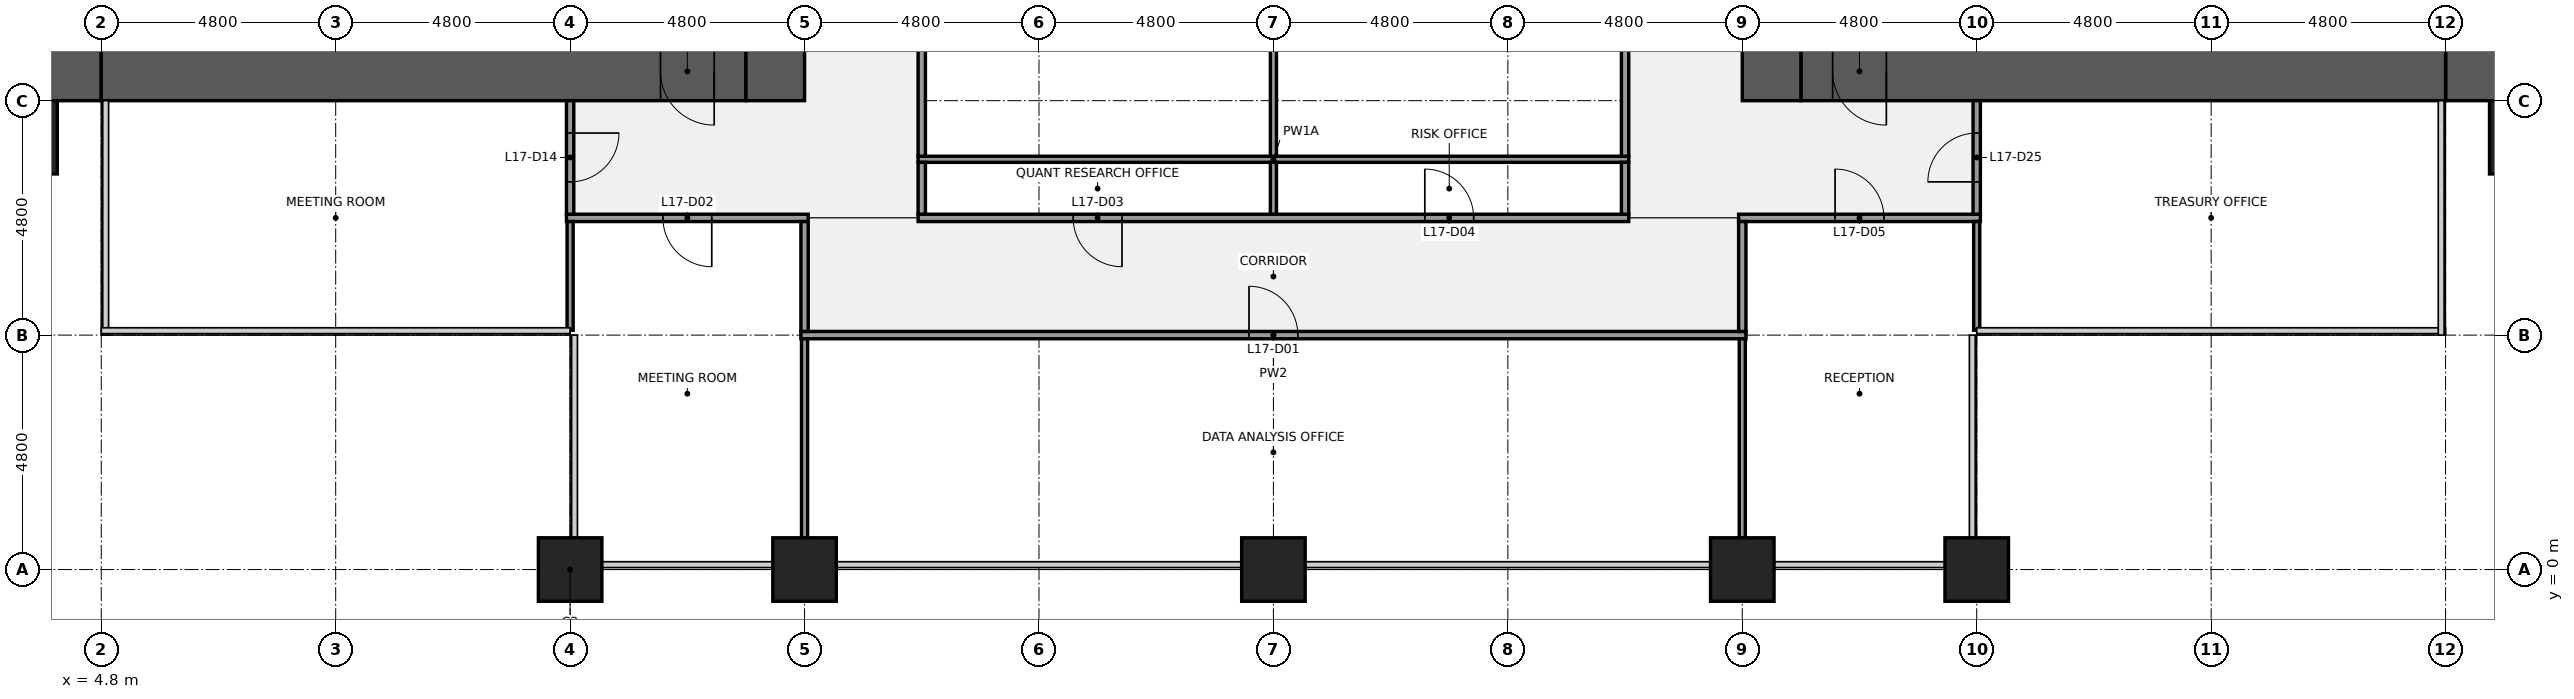
"""IFC4 building model, lengths in metres.
Left out: names, types, materials, properties, quantities, classifications, styles, units other than length and angle.
Written with IfcOpenShell. Run it as: python <this file> out.ifc"""

import sys

from ifc_helpers import new_model, si_unit, direction, frame, frame_2d, origin, origin_2d, place, context, subcontext, project, spatial, rectangle, extrude, element, fill, save


model = new_model("IFC4")
c1 = context("Model", 3, precision=1e-05, world=origin(), true_north=direction((0.0, 1.0)))
c2 = subcontext(c1, "Body", "Model", "MODEL_VIEW")
j1 = project(units=[si_unit("LENGTHUNIT", "METRE"), si_unit("PLANEANGLEUNIT", "RADIAN")], contexts=[c1])
p1 = place(None, origin())
s1 = spatial("IfcSite", under=j1, at=p1, CompositionType="ELEMENT")
p2 = place(p1, origin())
s2 = spatial("IfcBuilding", under=s1, at=p2, CompositionType="ELEMENT")
p3 = place(p2, frame((0.0, 0.0, 79.0)))
s3 = spatial("IfcBuildingStorey", under=s2, at=p3, CompositionType="ELEMENT", Elevation=79.0)
for number, where, z_axis, x_axis in (
    (1, (14.4, 0.0, 0.0), (0.0, 0.0, 1.0), (1.0, 0.0, 0.0)),
    (2, (19.2, 0.0, 0.0), (0.0, 0.0, 1.0), (1.0, 0.0, 0.0)),
    (3, (28.8, 0.0, 0.0), (0.0, 0.0, 1.0), (1.0, 0.0, 0.0)),
    (4, (38.4, 0.0, 0.0), (0.0, 0.0, 1.0), (1.0, 0.0, 0.0)),
    (5, (43.2, 0.0, 0.0), (0.0, 0.0, 1.0), (1.0, 0.0, 0.0)),
):
    element("IfcColumn", number, at=place(p3, frame(where, z_axis=z_axis, x_axis=x_axis)), inside=s3, PredefinedType="COLUMN", context=c2, shape_type="SweptSolid", body=[
        extrude(rectangle(XDim=1.3, YDim=1.3, at=origin_2d()), origin(), (0.0, 0.0, 1.0), 4.0),
    ])
p4 = place(p3, frame((4.8, 10.2, 0.0), z_axis=(0.0, 0.0, 1.0), x_axis=(-1.0, 0.0, 0.0)))
e6 = element("IfcWall", 6, at=p4, inside=s3, PredefinedType="SHEAR", context=c2, shape_type="SweptSolid", body=[
    extrude(rectangle(XDim=3.6, YDim=1.2, at=frame_2d((1.8, 0.0))), origin(), (0.0, 0.0, 1.0), 3.84),
])
p5 = place(p3, frame((18.0, 10.2, 0.0), z_axis=(0.0, 0.0, 1.0), x_axis=(-1.0, 0.0, 0.0)))
e7 = element("IfcWall", 7, at=p5, inside=s3, PredefinedType="SHEAR", context=c2, shape_type="SweptSolid", body=[
    extrude(rectangle(XDim=13.2, YDim=1.2, at=frame_2d((6.6, 0.0))), origin(), (0.0, 0.0, 1.0), 3.84),
])
p6 = place(p5, frame((0.65, 0.0, 0.0)))
e8 = element("IfcOpeningElement", 8, at=p6, cuts=e7, PredefinedType="OPENING", context=c2, shape_type="SweptSolid", body=[
    extrude(rectangle(XDim=1.1, YDim=2.1, at=frame_2d((0.55, 1.05))), frame((0.0, 0.61, 0.0), z_axis=(0.0, -1.0, 0.0), x_axis=(1.0, 0.0, 0.0)), (0.0, 0.0, 1.0), 1.22),
])
p7 = place(p3, frame((18.6, 38.4, 0.0), z_axis=(0.0, 0.0, 1.0), x_axis=(0.0, -1.0, 0.0)))
e9 = element("IfcWall", 9, at=p7, inside=s3, PredefinedType="SHEAR", context=c2, shape_type="SweptSolid", body=[
    extrude(rectangle(XDim=28.8, YDim=1.2, at=frame_2d((14.4, 0.0))), origin(), (0.0, 0.0, 1.0), 3.84),
])
p8 = place(p7, frame((18.3, 0.0, 0.0)))
e10 = element("IfcOpeningElement", 10, at=p8, cuts=e9, PredefinedType="OPENING", context=c2, shape_type="SweptSolid", body=[
    extrude(rectangle(XDim=1.8, YDim=2.1, at=frame_2d((0.9, 1.05))), frame((0.0, 0.61, 0.0), z_axis=(0.0, -1.0, 0.0), x_axis=(1.0, 0.0, 0.0)), (0.0, 0.0, 1.0), 1.22),
])
p9 = place(p7, frame((8.7, 0.0, 0.0)))
e11 = element("IfcOpeningElement", 11, at=p9, cuts=e9, PredefinedType="OPENING", context=c2, shape_type="SweptSolid", body=[
    extrude(rectangle(XDim=1.8, YDim=2.1, at=frame_2d((0.9, 1.05))), frame((0.0, 0.61, 0.0), z_axis=(0.0, -1.0, 0.0), x_axis=(1.0, 0.0, 0.0)), (0.0, 0.0, 1.0), 1.22),
])
p10 = place(p3, frame((56.4, 10.2, 0.0), z_axis=(0.0, 0.0, 1.0), x_axis=(-1.0, 0.0, 0.0)))
e12 = element("IfcWall", 12, at=p10, inside=s3, PredefinedType="SHEAR", context=c2, shape_type="SweptSolid", body=[
    extrude(rectangle(XDim=3.6, YDim=1.2, at=frame_2d((1.8, 0.0))), origin(), (0.0, 0.0, 1.0), 3.84),
])
p11 = place(p3, frame((52.8, 10.2, 0.0), z_axis=(0.0, 0.0, 1.0), x_axis=(-1.0, 0.0, 0.0)))
e13 = element("IfcWall", 13, at=p11, inside=s3, PredefinedType="SHEAR", context=c2, shape_type="SweptSolid", body=[
    extrude(rectangle(XDim=13.2, YDim=1.2, at=frame_2d((6.6, 0.0))), origin(), (0.0, 0.0, 1.0), 3.84),
])
p12 = place(p11, frame((11.45, 0.0, 0.0)))
e14 = element("IfcOpeningElement", 14, at=p12, cuts=e13, PredefinedType="OPENING", context=c2, shape_type="SweptSolid", body=[
    extrude(rectangle(XDim=1.1, YDim=2.1, at=frame_2d((0.55, 1.05))), frame((0.0, 0.61, 0.0), z_axis=(0.0, -1.0, 0.0), x_axis=(1.0, 0.0, 0.0)), (0.0, 0.0, 1.0), 1.22),
])
p13 = place(p3, frame((39.0, 9.6, 0.0), z_axis=(0.0, 0.0, 1.0), x_axis=(0.0, 1.0, 0.0)))
e15 = element("IfcWall", 15, at=p13, inside=s3, PredefinedType="SHEAR", context=c2, shape_type="SweptSolid", body=[
    extrude(rectangle(XDim=28.8, YDim=1.2, at=frame_2d((14.4, 0.0))), origin(), (0.0, 0.0, 1.0), 3.84),
])
p14 = place(p13, frame((8.7, 0.0, 0.0)))
e16 = element("IfcOpeningElement", 16, at=p14, cuts=e15, PredefinedType="OPENING", context=c2, shape_type="SweptSolid", body=[
    extrude(rectangle(XDim=1.8, YDim=2.1, at=frame_2d((0.9, 1.05))), frame((0.0, 0.61, 0.0), z_axis=(0.0, -1.0, 0.0), x_axis=(1.0, 0.0, 0.0)), (0.0, 0.0, 1.0), 1.22),
])
p15 = place(p13, frame((18.3, 0.0, 0.0)))
e17 = element("IfcOpeningElement", 17, at=p15, cuts=e15, PredefinedType="OPENING", context=c2, shape_type="SweptSolid", body=[
    extrude(rectangle(XDim=1.8, YDim=2.1, at=frame_2d((0.9, 1.05))), frame((0.0, 0.61, 0.0), z_axis=(0.0, -1.0, 0.0), x_axis=(1.0, 0.0, 0.0)), (0.0, 0.0, 1.0), 1.22),
])
p16 = place(p3, frame((19.125, 4.8, 0.0), z_axis=(0.0, 0.0, 1.0), x_axis=(1.0, 0.0, 0.0)))
e18 = element("IfcWall", 18, at=p16, inside=s3, PredefinedType="PARTITIONING", context=c2, shape_type="SweptSolid", body=[
    extrude(rectangle(XDim=19.35, YDim=0.15, at=frame_2d((9.675, 0.0))), origin(), (0.0, 0.0, 1.0), 2.849),
])
p17 = place(p16, frame((9.175, 0.0, 0.0)))
e19 = element("IfcOpeningElement", 19, at=p17, cuts=e18, PredefinedType="OPENING", context=c2, shape_type="SweptSolid", body=[
    extrude(rectangle(XDim=1.0, YDim=2.1, at=frame_2d((0.5, 1.05))), frame((0.0, 0.085, 0.0), z_axis=(0.0, -1.0, 0.0), x_axis=(1.0, 0.0, 0.0)), (0.0, 0.0, 1.0), 0.17),
])
p18 = place(p3, frame((14.325, 7.2, 0.0), z_axis=(0.0, 0.0, 1.0), x_axis=(1.0, 0.0, 0.0)))
e20 = element("IfcWall", 20, at=p18, inside=s3, PredefinedType="PARTITIONING", context=c2, shape_type="SweptSolid", body=[
    extrude(rectangle(XDim=4.95, YDim=0.15, at=frame_2d((2.475, 0.0))), origin(), (0.0, 0.0, 1.0), 2.849),
])
p19 = place(p18, frame((1.975, 0.0, 0.0)))
e21 = element("IfcOpeningElement", 21, at=p19, cuts=e20, PredefinedType="OPENING", context=c2, shape_type="SweptSolid", body=[
    extrude(rectangle(XDim=1.0, YDim=2.1, at=frame_2d((0.5, 1.05))), frame((0.0, 0.085, 0.0), z_axis=(0.0, -1.0, 0.0), x_axis=(1.0, 0.0, 0.0)), (0.0, 0.0, 1.0), 0.17),
])
p20 = place(p3, frame((21.525, 7.2, 0.0), z_axis=(0.0, 0.0, 1.0), x_axis=(1.0, 0.0, 0.0)))
e22 = element("IfcWall", 22, at=p20, inside=s3, PredefinedType="PARTITIONING", context=c2, shape_type="SweptSolid", body=[
    extrude(rectangle(XDim=14.55, YDim=0.15, at=frame_2d((7.275, 0.0))), origin(), (0.0, 0.0, 1.0), 2.849),
])
p21 = place(p20, frame((3.175, 0.0, 0.0)))
e23 = element("IfcOpeningElement", 23, at=p21, cuts=e22, PredefinedType="OPENING", context=c2, shape_type="SweptSolid", body=[
    extrude(rectangle(XDim=1.0, YDim=2.1, at=frame_2d((0.5, 1.05))), frame((0.0, 0.085, 0.0), z_axis=(0.0, -1.0, 0.0), x_axis=(1.0, 0.0, 0.0)), (0.0, 0.0, 1.0), 0.17),
])
p22 = place(p20, frame((10.375, 0.0, 0.0)))
e24 = element("IfcOpeningElement", 24, at=p22, cuts=e22, PredefinedType="OPENING", context=c2, shape_type="SweptSolid", body=[
    extrude(rectangle(XDim=1.0, YDim=2.1, at=frame_2d((0.5, 1.05))), frame((0.0, 0.085, 0.0), z_axis=(0.0, -1.0, 0.0), x_axis=(1.0, 0.0, 0.0)), (0.0, 0.0, 1.0), 0.17),
])
p23 = place(p3, frame((38.325, 7.2, 0.0), z_axis=(0.0, 0.0, 1.0), x_axis=(1.0, 0.0, 0.0)))
e25 = element("IfcWall", 25, at=p23, inside=s3, PredefinedType="PARTITIONING", context=c2, shape_type="SweptSolid", body=[
    extrude(rectangle(XDim=4.95, YDim=0.15, at=frame_2d((2.475, 0.0))), origin(), (0.0, 0.0, 1.0), 2.849),
])
p24 = place(p23, frame((1.975, 0.0, 0.0)))
e26 = element("IfcOpeningElement", 26, at=p24, cuts=e25, PredefinedType="OPENING", context=c2, shape_type="SweptSolid", body=[
    extrude(rectangle(XDim=1.0, YDim=2.1, at=frame_2d((0.5, 1.05))), frame((0.0, 0.085, 0.0), z_axis=(0.0, -1.0, 0.0), x_axis=(1.0, 0.0, 0.0)), (0.0, 0.0, 1.0), 0.17),
])
p25 = place(p3, frame((21.525, 8.4, 0.0), z_axis=(0.0, 0.0, 1.0), x_axis=(1.0, 0.0, 0.0)))
e27 = element("IfcWall", 27, at=p25, inside=s3, PredefinedType="PARTITIONING", context=c2, shape_type="SweptSolid", body=[
    extrude(rectangle(XDim=14.55, YDim=0.125, at=frame_2d((7.275, 0.0))), origin(), (0.0, 0.0, 1.0), 2.849),
])
p26 = place(p3, frame((14.4, 4.9, 0.0), z_axis=(0.0, 0.0, 1.0), x_axis=(0.0, 1.0, 0.0)))
e28 = element("IfcWall", 28, at=p26, inside=s3, PredefinedType="PARTITIONING", context=c2, shape_type="SweptSolid", body=[
    extrude(rectangle(XDim=2.225, YDim=0.125, at=frame_2d((1.113, 0.0))), origin(), (0.0, 0.0, 1.0), 2.849),
])
p27 = place(p3, frame((14.4, 7.275, 0.0), z_axis=(0.0, 0.0, 1.0), x_axis=(0.0, 1.0, 0.0)))
e29 = element("IfcWall", 29, at=p27, inside=s3, PredefinedType="PARTITIONING", context=c2, shape_type="SweptSolid", body=[
    extrude(rectangle(XDim=2.325, YDim=0.15, at=frame_2d((1.163, 0.0))), origin(), (0.0, 0.0, 1.0), 2.849),
])
p28 = place(p27, frame((0.663, 0.0, 0.0)))
e30 = element("IfcOpeningElement", 30, at=p28, cuts=e29, PredefinedType="OPENING", context=c2, shape_type="SweptSolid", body=[
    extrude(rectangle(XDim=1.0, YDim=2.1, at=frame_2d((0.5, 1.05))), frame((0.0, 0.085, 0.0), z_axis=(0.0, -1.0, 0.0), x_axis=(1.0, 0.0, 0.0)), (0.0, 0.0, 1.0), 0.17),
])
p29 = place(p3, frame((19.2, 0.65, 0.0), z_axis=(0.0, 0.0, 1.0), x_axis=(0.0, 1.0, 0.0)))
e31 = element("IfcWall", 31, at=p29, inside=s3, PredefinedType="PARTITIONING", context=c2, shape_type="SweptSolid", body=[
    extrude(rectangle(XDim=4.075, YDim=0.125, at=frame_2d((2.038, 0.0))), origin(), (0.0, 0.0, 1.0), 2.849),
])
p30 = place(p3, frame((19.2, 4.875, 0.0), z_axis=(0.0, 0.0, 1.0), x_axis=(0.0, 1.0, 0.0)))
e32 = element("IfcWall", 32, at=p30, inside=s3, PredefinedType="PARTITIONING", context=c2, shape_type="SweptSolid", body=[
    extrude(rectangle(XDim=2.25, YDim=0.15, at=frame_2d((1.125, 0.0))), origin(), (0.0, 0.0, 1.0), 2.849),
])
p31 = place(p3, frame((21.6, 7.275, 0.0), z_axis=(0.0, 0.0, 1.0), x_axis=(0.0, 1.0, 0.0)))
e33 = element("IfcWall", 33, at=p31, inside=s3, PredefinedType="PARTITIONING", context=c2, shape_type="SweptSolid", body=[
    extrude(rectangle(XDim=1.062, YDim=0.15, at=frame_2d((0.531, 0.0))), origin(), (0.0, 0.0, 1.0), 2.849),
])
p32 = place(p3, frame((21.6, 8.462, 0.0), z_axis=(0.0, 0.0, 1.0), x_axis=(0.0, 1.0, 0.0)))
e34 = element("IfcWall", 34, at=p32, inside=s3, PredefinedType="PARTITIONING", context=c2, shape_type="SweptSolid", body=[
    extrude(rectangle(XDim=5.875, YDim=0.15, at=frame_2d((2.938, 0.0))), origin(), (0.0, 0.0, 1.0), 2.849),
])
p33 = place(p32, frame((2.438, 0.0, 0.0)))
e35 = element("IfcOpeningElement", 35, at=p33, cuts=e34, PredefinedType="OPENING", context=c2, shape_type="SweptSolid", body=[
    extrude(rectangle(XDim=1.0, YDim=2.1, at=frame_2d((0.5, 1.05))), frame((0.0, 0.085, 0.0), z_axis=(0.0, -1.0, 0.0), x_axis=(1.0, 0.0, 0.0)), (0.0, 0.0, 1.0), 0.17),
])
p34 = place(p3, frame((28.8, 7.275, 0.0), z_axis=(0.0, 0.0, 1.0), x_axis=(0.0, 1.0, 0.0)))
e36 = element("IfcWall", 36, at=p34, inside=s3, PredefinedType="PARTITIONING", context=c2, shape_type="SweptSolid", body=[
    extrude(rectangle(XDim=1.062, YDim=0.125, at=frame_2d((0.531, 0.0))), origin(), (0.0, 0.0, 1.0), 2.849),
])
p35 = place(p3, frame((28.8, 8.462, 0.0), z_axis=(0.0, 0.0, 1.0), x_axis=(0.0, 1.0, 0.0)))
e37 = element("IfcWall", 37, at=p35, inside=s3, PredefinedType="PARTITIONING", context=c2, shape_type="SweptSolid", body=[
    extrude(rectangle(XDim=5.875, YDim=0.125, at=frame_2d((2.938, 0.0))), origin(), (0.0, 0.0, 1.0), 2.849),
])
p36 = place(p3, frame((36.0, 7.275, 0.0), z_axis=(0.0, 0.0, 1.0), x_axis=(0.0, 1.0, 0.0)))
e38 = element("IfcWall", 38, at=p36, inside=s3, PredefinedType="PARTITIONING", context=c2, shape_type="SweptSolid", body=[
    extrude(rectangle(XDim=1.062, YDim=0.15, at=frame_2d((0.531, 0.0))), origin(), (0.0, 0.0, 1.0), 2.849),
])
p37 = place(p3, frame((36.0, 8.462, 0.0), z_axis=(0.0, 0.0, 1.0), x_axis=(0.0, 1.0, 0.0)))
e39 = element("IfcWall", 39, at=p37, inside=s3, PredefinedType="PARTITIONING", context=c2, shape_type="SweptSolid", body=[
    extrude(rectangle(XDim=5.875, YDim=0.15, at=frame_2d((2.938, 0.0))), origin(), (0.0, 0.0, 1.0), 2.849),
])
p38 = place(p37, frame((2.438, 0.0, 0.0)))
e40 = element("IfcOpeningElement", 40, at=p38, cuts=e39, PredefinedType="OPENING", context=c2, shape_type="SweptSolid", body=[
    extrude(rectangle(XDim=1.0, YDim=2.1, at=frame_2d((0.5, 1.05))), frame((0.0, 0.085, 0.0), z_axis=(0.0, -1.0, 0.0), x_axis=(1.0, 0.0, 0.0)), (0.0, 0.0, 1.0), 0.17),
])
p39 = place(p3, frame((38.4, 0.65, 0.0), z_axis=(0.0, 0.0, 1.0), x_axis=(0.0, 1.0, 0.0)))
e41 = element("IfcWall", 41, at=p39, inside=s3, PredefinedType="PARTITIONING", context=c2, shape_type="SweptSolid", body=[
    extrude(rectangle(XDim=4.075, YDim=0.125, at=frame_2d((2.038, 0.0))), origin(), (0.0, 0.0, 1.0), 2.849),
])
p40 = place(p3, frame((38.4, 4.875, 0.0), z_axis=(0.0, 0.0, 1.0), x_axis=(0.0, 1.0, 0.0)))
e42 = element("IfcWall", 42, at=p40, inside=s3, PredefinedType="PARTITIONING", context=c2, shape_type="SweptSolid", body=[
    extrude(rectangle(XDim=2.25, YDim=0.15, at=frame_2d((1.125, 0.0))), origin(), (0.0, 0.0, 1.0), 2.849),
])
p41 = place(p3, frame((43.2, 4.9, 0.0), z_axis=(0.0, 0.0, 1.0), x_axis=(0.0, 1.0, 0.0)))
e43 = element("IfcWall", 43, at=p41, inside=s3, PredefinedType="PARTITIONING", context=c2, shape_type="SweptSolid", body=[
    extrude(rectangle(XDim=2.225, YDim=0.125, at=frame_2d((1.113, 0.0))), origin(), (0.0, 0.0, 1.0), 2.849),
])
p42 = place(p3, frame((43.2, 7.275, 0.0), z_axis=(0.0, 0.0, 1.0), x_axis=(0.0, 1.0, 0.0)))
e44 = element("IfcWall", 44, at=p42, inside=s3, PredefinedType="PARTITIONING", context=c2, shape_type="SweptSolid", body=[
    extrude(rectangle(XDim=2.325, YDim=0.15, at=frame_2d((1.163, 0.0))), origin(), (0.0, 0.0, 1.0), 2.849),
])
p43 = place(p42, frame((0.663, 0.0, 0.0)))
e45 = element("IfcOpeningElement", 45, at=p43, cuts=e44, PredefinedType="OPENING", context=c2, shape_type="SweptSolid", body=[
    extrude(rectangle(XDim=1.0, YDim=2.1, at=frame_2d((0.5, 1.05))), frame((0.0, 0.085, 0.0), z_axis=(0.0, -1.0, 0.0), x_axis=(1.0, 0.0, 0.0)), (0.0, 0.0, 1.0), 0.17),
])
for number, where, z_axis, x_axis in (
    (46, (55.2, 8.85, 0.0), (0.0, 0.0, 1.0), (1.0, 0.0, 0.0)),
    (47, (2.4, 8.85, 0.0), (0.0, 0.0, 1.0), (1.0, 0.0, 0.0)),
):
    element("IfcColumn", number, at=place(p3, frame(where, z_axis=z_axis, x_axis=x_axis)), inside=s3, PredefinedType="PILASTER", context=c2, shape_type="SweptSolid", body=[
        extrude(rectangle(XDim=3.0, YDim=1.5, at=origin_2d()), origin(), (0.0, 0.0, 1.0), 4.0),
    ])
for number, where, z_axis, x_axis in (
    (48, (14.4, -1.075, 0.0), (0.0, 0.0, 1.0), (1.0, 0.0, 0.0)),
    (49, (19.2, -1.075, 0.0), (0.0, 0.0, 1.0), (1.0, 0.0, 0.0)),
    (50, (38.4, -1.075, 0.0), (0.0, 0.0, 1.0), (1.0, 0.0, 0.0)),
    (51, (43.2, -1.075, 0.0), (0.0, 0.0, 1.0), (1.0, 0.0, 0.0)),
):
    element("IfcColumn", number, at=place(p3, frame(where, z_axis=z_axis, x_axis=x_axis)), inside=s3, PredefinedType="PILASTER", context=c2, shape_type="SweptSolid", body=[
        extrude(rectangle(XDim=4.2, YDim=0.85, at=origin_2d()), origin(), (0.0, 0.0, 1.0), 4.0),
    ])
p44 = place(p6, origin())
e52 = element("IfcDoor", 52, at=p44, inside=s3, OperationType="SINGLE_SWING_LEFT", PredefinedType="DOOR", context=c2, shape_type="SweptSolid", body=[
    extrude(rectangle(XDim=1.1, YDim=2.1, at=frame_2d((0.55, 1.05))), frame((0.0, 0.025, 0.0), z_axis=(0.0, -1.0, 0.0), x_axis=(1.0, 0.0, 0.0)), (0.0, 0.0, 1.0), 0.05),
])
fill(e8, e52)
p45 = place(p12, origin())
e53 = element("IfcDoor", 53, at=p45, inside=s3, OperationType="SINGLE_SWING_LEFT", PredefinedType="DOOR", context=c2, shape_type="SweptSolid", body=[
    extrude(rectangle(XDim=1.1, YDim=2.1, at=frame_2d((0.55, 1.05))), frame((0.0, 0.025, 0.0), z_axis=(0.0, -1.0, 0.0), x_axis=(1.0, 0.0, 0.0)), (0.0, 0.0, 1.0), 0.05),
])
fill(e14, e53)
p46 = place(p17, origin())
e54 = element("IfcDoor", 54, at=p46, inside=s3, OperationType="SINGLE_SWING_LEFT", PredefinedType="DOOR", context=c2, shape_type="SweptSolid", body=[
    extrude(rectangle(XDim=1.0, YDim=2.1, at=frame_2d((0.5, 1.05))), frame((0.0, 0.025, 0.0), z_axis=(0.0, -1.0, 0.0), x_axis=(1.0, 0.0, 0.0)), (0.0, 0.0, 1.0), 0.05),
])
fill(e19, e54)
p47 = place(p19, origin())
e55 = element("IfcDoor", 55, at=p47, inside=s3, OperationType="SINGLE_SWING_RIGHT", PredefinedType="DOOR", context=c2, shape_type="SweptSolid", body=[
    extrude(rectangle(XDim=1.0, YDim=2.1, at=frame_2d((0.5, 1.05))), frame((0.0, 0.025, 0.0), z_axis=(0.0, -1.0, 0.0), x_axis=(1.0, 0.0, 0.0)), (0.0, 0.0, 1.0), 0.05),
])
fill(e21, e55)
p48 = place(p21, origin())
e56 = element("IfcDoor", 56, at=p48, inside=s3, OperationType="SINGLE_SWING_RIGHT", PredefinedType="DOOR", context=c2, shape_type="SweptSolid", body=[
    extrude(rectangle(XDim=1.0, YDim=2.1, at=frame_2d((0.5, 1.05))), frame((0.0, 0.025, 0.0), z_axis=(0.0, -1.0, 0.0), x_axis=(1.0, 0.0, 0.0)), (0.0, 0.0, 1.0), 0.05),
])
fill(e23, e56)
p49 = place(p22, origin())
e57 = element("IfcDoor", 57, at=p49, inside=s3, OperationType="SINGLE_SWING_LEFT", PredefinedType="DOOR", context=c2, shape_type="SweptSolid", body=[
    extrude(rectangle(XDim=1.0, YDim=2.1, at=frame_2d((0.5, 1.05))), frame((0.0, 0.025, 0.0), z_axis=(0.0, -1.0, 0.0), x_axis=(1.0, 0.0, 0.0)), (0.0, 0.0, 1.0), 0.05),
])
fill(e24, e57)
p50 = place(p24, origin())
e58 = element("IfcDoor", 58, at=p50, inside=s3, OperationType="SINGLE_SWING_LEFT", PredefinedType="DOOR", context=c2, shape_type="SweptSolid", body=[
    extrude(rectangle(XDim=1.0, YDim=2.1, at=frame_2d((0.5, 1.05))), frame((0.0, 0.025, 0.0), z_axis=(0.0, -1.0, 0.0), x_axis=(1.0, 0.0, 0.0)), (0.0, 0.0, 1.0), 0.05),
])
fill(e26, e58)
p51 = place(p28, origin())
e59 = element("IfcDoor", 59, at=p51, inside=s3, OperationType="SINGLE_SWING_RIGHT", PredefinedType="DOOR", context=c2, shape_type="SweptSolid", body=[
    extrude(rectangle(XDim=1.0, YDim=2.1, at=frame_2d((0.5, 1.05))), frame((0.0, 0.025, 0.0), z_axis=(0.0, -1.0, 0.0), x_axis=(1.0, 0.0, 0.0)), (0.0, 0.0, 1.0), 0.05),
])
fill(e30, e59)
p52 = place(p43, origin())
e60 = element("IfcDoor", 60, at=p52, inside=s3, OperationType="SINGLE_SWING_LEFT", PredefinedType="DOOR", context=c2, shape_type="SweptSolid", body=[
    extrude(rectangle(XDim=1.0, YDim=2.1, at=frame_2d((0.5, 1.05))), frame((0.0, 0.025, 0.0), z_axis=(0.0, -1.0, 0.0), x_axis=(1.0, 0.0, 0.0)), (0.0, 0.0, 1.0), 0.05),
])
fill(e45, e60)
save(model, sys.argv[1])
